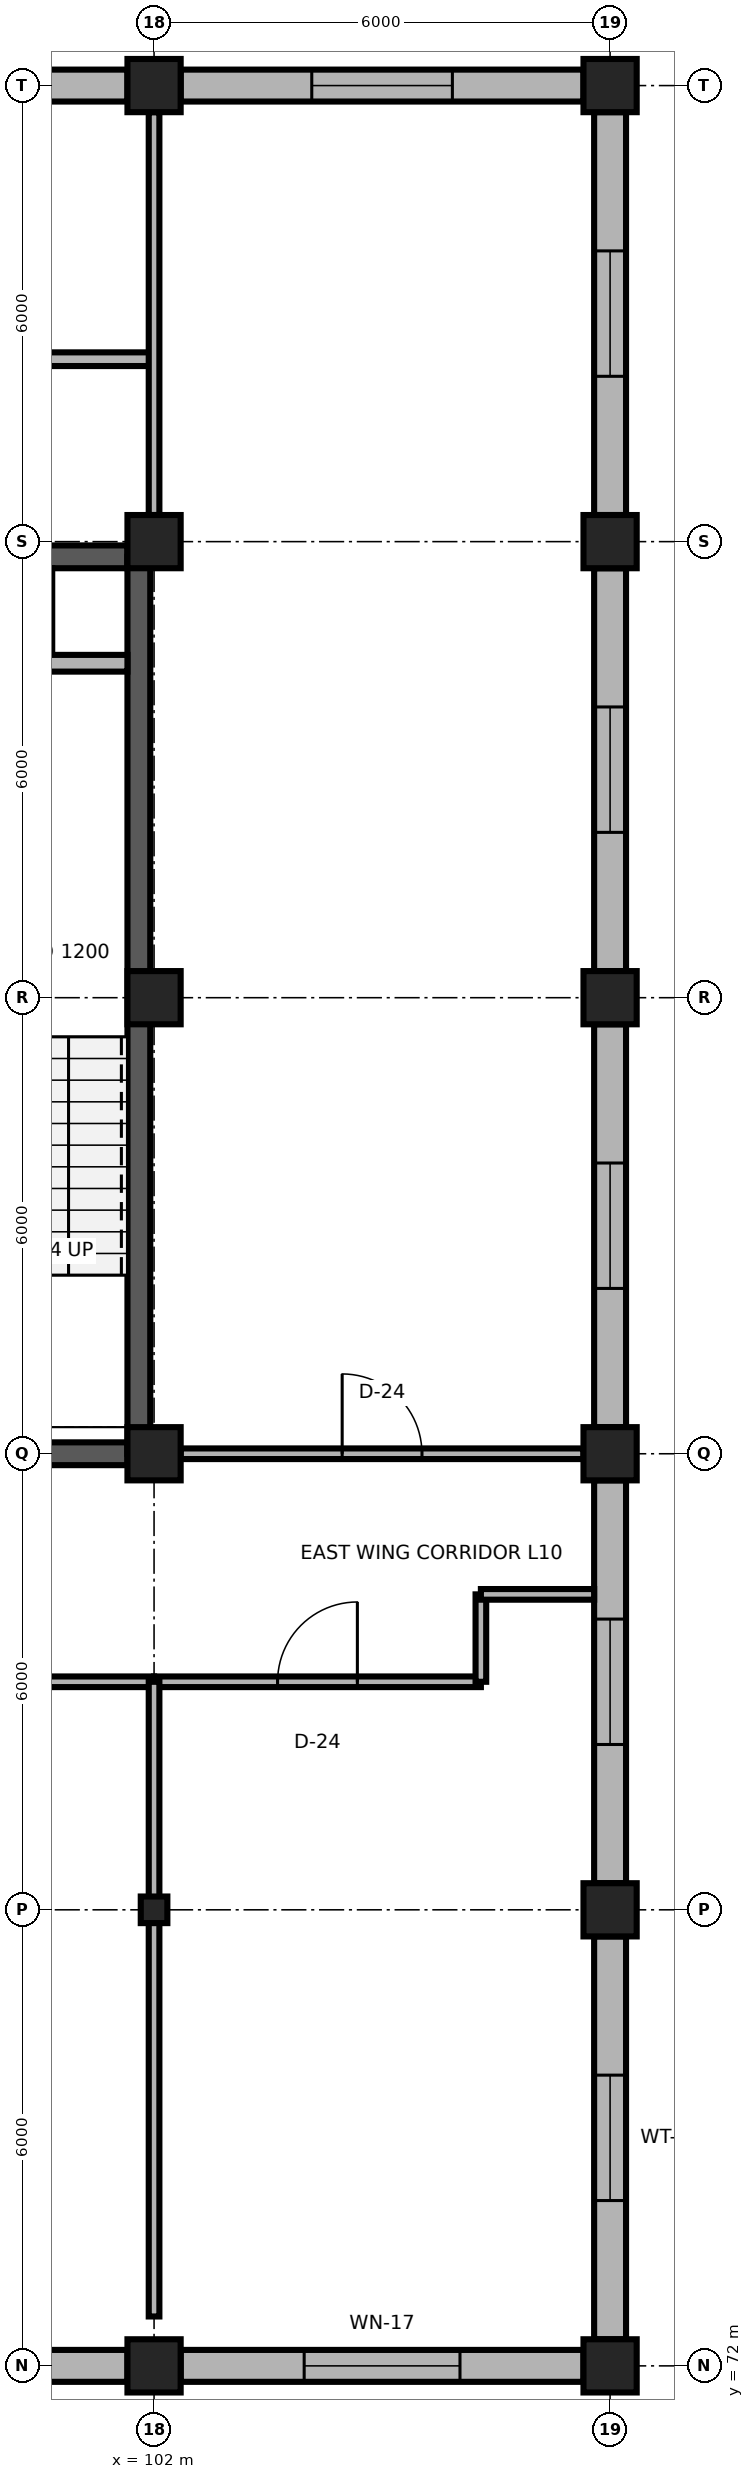
"""IFC4 building model, lengths in metres.
Left out: names, types, materials, properties, quantities, classifications, styles, units other than length and angle.
Written with IfcOpenShell. Run it as: python <this file> out.ifc"""

import sys

from ifc_helpers import new_model, si_unit, direction, frame, frame_2d, origin, origin_2d, place, context, subcontext, project, spatial, rectangle, i_section, extrude, element, fill, save


model = new_model("IFC4")
c1 = context("Model", 3, precision=1e-05, world=origin(), true_north=direction((0.0, 1.0)))
c2 = subcontext(c1, "Body", "Model", "MODEL_VIEW")
j1 = project(units=[si_unit("LENGTHUNIT", "METRE"), si_unit("PLANEANGLEUNIT", "RADIAN")], contexts=[c1])
p1 = place(None, origin())
s1 = spatial("IfcSite", under=j1, at=p1, CompositionType="ELEMENT")
p2 = place(p1, origin())
s2 = spatial("IfcBuilding", under=s1, at=p2, CompositionType="ELEMENT")
p3 = place(p2, frame((0.0, 0.0, 40.5)))
s3 = spatial("IfcBuildingStorey", under=s2, at=p3, CompositionType="ELEMENT", Elevation=40.5)
for number, where, z_axis, x_axis in (
    (1, (102.0, 72.0, 0.0), (0.0, 0.0, 1.0), (1.0, 0.0, 0.0)),
    (2, (108.0, 72.0, 0.0), (0.0, 0.0, 1.0), (1.0, 0.0, 0.0)),
):
    element("IfcColumn", number, at=place(p3, frame(where, z_axis=z_axis, x_axis=x_axis)), inside=s3, PredefinedType="COLUMN", context=c2, shape_type="SweptSolid", body=[
        extrude(rectangle(XDim=0.7, YDim=0.7, at=origin_2d()), origin(), (0.0, 0.0, 1.0), 3.9),
    ])
p4 = place(p3, frame((102.0, 78.0, 0.0), z_axis=(0.0, 0.0, 1.0), x_axis=(1.0, 0.0, 0.0)))
e3 = element("IfcColumn", 3, at=p4, inside=s3, PredefinedType="COLUMN", context=c2, shape_type="SweptSolid", body=[
    extrude(i_section(OverallWidth=0.35, OverallDepth=0.35, WebThickness=0.012, FlangeThickness=0.019, FilletRadius=0.02, at=origin_2d()), origin(), (0.0, 0.0, 1.0), 3.9),
])
for number, where, z_axis, x_axis in (
    (4, (108.0, 78.0, 0.0), (0.0, 0.0, 1.0), (1.0, 0.0, 0.0)),
    (5, (102.0, 84.0, 0.0), (0.0, 0.0, 1.0), (1.0, 0.0, 0.0)),
    (6, (108.0, 84.0, 0.0), (0.0, 0.0, 1.0), (1.0, 0.0, 0.0)),
    (7, (102.0, 90.0, 0.0), (0.0, 0.0, 1.0), (1.0, 0.0, 0.0)),
    (8, (108.0, 90.0, 0.0), (0.0, 0.0, 1.0), (1.0, 0.0, 0.0)),
    (9, (102.0, 96.0, 0.0), (0.0, 0.0, 1.0), (1.0, 0.0, 0.0)),
    (10, (108.0, 96.0, 0.0), (0.0, 0.0, 1.0), (1.0, 0.0, 0.0)),
    (11, (102.0, 102.0, 0.0), (0.0, 0.0, 1.0), (1.0, 0.0, 0.0)),
    (12, (108.0, 102.0, 0.0), (0.0, 0.0, 1.0), (1.0, 0.0, 0.0)),
):
    element("IfcColumn", number, at=place(p3, frame(where, z_axis=z_axis, x_axis=x_axis)), inside=s3, PredefinedType="COLUMN", context=c2, shape_type="SweptSolid", body=[
        extrude(rectangle(XDim=0.7, YDim=0.7, at=origin_2d()), origin(), (0.0, 0.0, 1.0), 3.9),
    ])
p5 = place(p3, frame((96.35, 72.0, 0.0), z_axis=(0.0, 0.0, 1.0), x_axis=(1.0, 0.0, 0.0)))
e13 = element("IfcWall", 13, at=p5, inside=s3, PredefinedType="SOLIDWALL", context=c2, shape_type="SweptSolid", body=[
    extrude(rectangle(XDim=5.3, YDim=0.42, at=frame_2d((2.65, 0.0))), origin(), (0.0, 0.0, 1.0), 3.32),
])
p6 = place(p5, frame((1.625, 0.0, 0.85)))
e14 = element("IfcOpeningElement", 14, at=p6, cuts=e13, PredefinedType="OPENING", context=c2, shape_type="SweptSolid", body=[
    extrude(rectangle(XDim=2.05, YDim=2.0, at=frame_2d((1.025, 1.0))), frame((0.0, 0.225, 0.0), z_axis=(0.0, -1.0, 0.0), x_axis=(1.0, 0.0, 0.0)), (0.0, 0.0, 1.0), 0.45),
])
p7 = place(p3, frame((102.35, 72.0, 0.0), z_axis=(0.0, 0.0, 1.0), x_axis=(1.0, 0.0, 0.0)))
e15 = element("IfcWall", 15, at=p7, inside=s3, PredefinedType="SOLIDWALL", context=c2, shape_type="SweptSolid", body=[
    extrude(rectangle(XDim=5.3, YDim=0.42, at=frame_2d((2.65, 0.0))), origin(), (0.0, 0.0, 1.0), 3.32),
])
p8 = place(p7, frame((1.625, 0.0, 0.85)))
e16 = element("IfcOpeningElement", 16, at=p8, cuts=e15, PredefinedType="OPENING", context=c2, shape_type="SweptSolid", body=[
    extrude(rectangle(XDim=2.05, YDim=2.0, at=frame_2d((1.025, 1.0))), frame((0.0, 0.225, 0.0), z_axis=(0.0, -1.0, 0.0), x_axis=(1.0, 0.0, 0.0)), (0.0, 0.0, 1.0), 0.45),
])
p9 = place(p3, frame((96.35, 102.0, 0.0), z_axis=(0.0, 0.0, 1.0), x_axis=(1.0, 0.0, 0.0)))
e17 = element("IfcWall", 17, at=p9, inside=s3, PredefinedType="SOLIDWALL", context=c2, shape_type="SweptSolid", body=[
    extrude(rectangle(XDim=5.3, YDim=0.42, at=frame_2d((2.65, 0.0))), origin(), (0.0, 0.0, 1.0), 3.32),
])
p10 = place(p9, frame((1.725, 0.0, 0.85)))
e18 = element("IfcOpeningElement", 18, at=p10, cuts=e17, PredefinedType="OPENING", context=c2, shape_type="SweptSolid", body=[
    extrude(rectangle(XDim=1.85, YDim=2.0, at=frame_2d((0.925, 1.0))), frame((0.0, 0.225, 0.0), z_axis=(0.0, -1.0, 0.0), x_axis=(1.0, 0.0, 0.0)), (0.0, 0.0, 1.0), 0.45),
])
p11 = place(p3, frame((102.35, 102.0, 0.0), z_axis=(0.0, 0.0, 1.0), x_axis=(1.0, 0.0, 0.0)))
e19 = element("IfcWall", 19, at=p11, inside=s3, PredefinedType="SOLIDWALL", context=c2, shape_type="SweptSolid", body=[
    extrude(rectangle(XDim=5.3, YDim=0.42, at=frame_2d((2.65, 0.0))), origin(), (0.0, 0.0, 1.0), 3.32),
])
p12 = place(p11, frame((1.725, 0.0, 0.85)))
e20 = element("IfcOpeningElement", 20, at=p12, cuts=e19, PredefinedType="OPENING", context=c2, shape_type="SweptSolid", body=[
    extrude(rectangle(XDim=1.85, YDim=2.0, at=frame_2d((0.925, 1.0))), frame((0.0, 0.225, 0.0), z_axis=(0.0, -1.0, 0.0), x_axis=(1.0, 0.0, 0.0)), (0.0, 0.0, 1.0), 0.45),
])
p13 = place(p3, frame((108.0, 72.35, 0.0), z_axis=(0.0, 0.0, 1.0), x_axis=(0.0, 1.0, 0.0)))
e21 = element("IfcWall", 21, at=p13, inside=s3, PredefinedType="SOLIDWALL", context=c2, shape_type="SweptSolid", body=[
    extrude(rectangle(XDim=5.3, YDim=0.42, at=frame_2d((2.65, 0.0))), origin(), (0.0, 0.0, 1.0), 3.32),
])
p14 = place(p13, frame((1.825, 0.0, 0.85)))
e22 = element("IfcOpeningElement", 22, at=p14, cuts=e21, PredefinedType="OPENING", context=c2, shape_type="SweptSolid", body=[
    extrude(rectangle(XDim=1.65, YDim=1.95, at=frame_2d((0.825, 0.975))), frame((0.0, 0.225, 0.0), z_axis=(0.0, -1.0, 0.0), x_axis=(1.0, 0.0, 0.0)), (0.0, 0.0, 1.0), 0.45),
])
p15 = place(p3, frame((108.0, 78.35, 0.0), z_axis=(0.0, 0.0, 1.0), x_axis=(0.0, 1.0, 0.0)))
e23 = element("IfcWall", 23, at=p15, inside=s3, PredefinedType="SOLIDWALL", context=c2, shape_type="SweptSolid", body=[
    extrude(rectangle(XDim=5.3, YDim=0.42, at=frame_2d((2.65, 0.0))), origin(), (0.0, 0.0, 1.0), 3.32),
])
p16 = place(p15, frame((1.825, 0.0, 0.85)))
e24 = element("IfcOpeningElement", 24, at=p16, cuts=e23, PredefinedType="OPENING", context=c2, shape_type="SweptSolid", body=[
    extrude(rectangle(XDim=1.65, YDim=1.95, at=frame_2d((0.825, 0.975))), frame((0.0, 0.225, 0.0), z_axis=(0.0, -1.0, 0.0), x_axis=(1.0, 0.0, 0.0)), (0.0, 0.0, 1.0), 0.45),
])
p17 = place(p3, frame((108.0, 84.35, 0.0), z_axis=(0.0, 0.0, 1.0), x_axis=(0.0, 1.0, 0.0)))
e25 = element("IfcWall", 25, at=p17, inside=s3, PredefinedType="SOLIDWALL", context=c2, shape_type="SweptSolid", body=[
    extrude(rectangle(XDim=5.3, YDim=0.42, at=frame_2d((2.65, 0.0))), origin(), (0.0, 0.0, 1.0), 3.32),
])
p18 = place(p17, frame((1.825, 0.0, 0.85)))
e26 = element("IfcOpeningElement", 26, at=p18, cuts=e25, PredefinedType="OPENING", context=c2, shape_type="SweptSolid", body=[
    extrude(rectangle(XDim=1.65, YDim=1.95, at=frame_2d((0.825, 0.975))), frame((0.0, 0.225, 0.0), z_axis=(0.0, -1.0, 0.0), x_axis=(1.0, 0.0, 0.0)), (0.0, 0.0, 1.0), 0.45),
])
p19 = place(p3, frame((108.0, 90.35, 0.0), z_axis=(0.0, 0.0, 1.0), x_axis=(0.0, 1.0, 0.0)))
e27 = element("IfcWall", 27, at=p19, inside=s3, PredefinedType="SOLIDWALL", context=c2, shape_type="SweptSolid", body=[
    extrude(rectangle(XDim=5.3, YDim=0.42, at=frame_2d((2.65, 0.0))), origin(), (0.0, 0.0, 1.0), 3.32),
])
p20 = place(p19, frame((1.825, 0.0, 0.85)))
e28 = element("IfcOpeningElement", 28, at=p20, cuts=e27, PredefinedType="OPENING", context=c2, shape_type="SweptSolid", body=[
    extrude(rectangle(XDim=1.65, YDim=1.95, at=frame_2d((0.825, 0.975))), frame((0.0, 0.225, 0.0), z_axis=(0.0, -1.0, 0.0), x_axis=(1.0, 0.0, 0.0)), (0.0, 0.0, 1.0), 0.45),
])
p21 = place(p3, frame((108.0, 96.35, 0.0), z_axis=(0.0, 0.0, 1.0), x_axis=(0.0, 1.0, 0.0)))
e29 = element("IfcWall", 29, at=p21, inside=s3, PredefinedType="SOLIDWALL", context=c2, shape_type="SweptSolid", body=[
    extrude(rectangle(XDim=5.3, YDim=0.42, at=frame_2d((2.65, 0.0))), origin(), (0.0, 0.0, 1.0), 3.32),
])
p22 = place(p21, frame((1.825, 0.0, 0.85)))
e30 = element("IfcOpeningElement", 30, at=p22, cuts=e29, PredefinedType="OPENING", context=c2, shape_type="SweptSolid", body=[
    extrude(rectangle(XDim=1.65, YDim=1.95, at=frame_2d((0.825, 0.975))), frame((0.0, 0.225, 0.0), z_axis=(0.0, -1.0, 0.0), x_axis=(1.0, 0.0, 0.0)), (0.0, 0.0, 1.0), 0.45),
])
p23 = place(p3, frame((96.35, 84.0, 0.0), z_axis=(0.0, 0.0, 1.0), x_axis=(1.0, 0.0, 0.0)))
e31 = element("IfcWall", 31, at=p23, inside=s3, PredefinedType="SHEAR", context=c2, shape_type="SweptSolid", body=[
    extrude(rectangle(XDim=5.3, YDim=0.3, at=frame_2d((2.65, 0.0))), origin(), (0.0, 0.0, 1.0), 3.66),
])
p24 = place(p23, frame((1.975, 0.0, 0.0)))
e32 = element("IfcOpeningElement", 32, at=p24, cuts=e31, PredefinedType="OPENING", context=c2, shape_type="SweptSolid", body=[
    extrude(rectangle(XDim=1.35, YDim=2.2, at=frame_2d((0.675, 1.1))), frame((0.0, 0.165, 0.0), z_axis=(0.0, -1.0, 0.0), x_axis=(1.0, 0.0, 0.0)), (0.0, 0.0, 1.0), 0.33),
])
p25 = place(p3, frame((96.35, 95.8, 0.0), z_axis=(0.0, 0.0, 1.0), x_axis=(1.0, 0.0, 0.0)))
e33 = element("IfcWall", 33, at=p25, inside=s3, PredefinedType="SHEAR", context=c2, shape_type="SweptSolid", body=[
    extrude(rectangle(XDim=5.3, YDim=0.3, at=frame_2d((2.65, 0.0))), origin(), (0.0, 0.0, 1.0), 3.74),
])
p26 = place(p3, frame((101.8, 84.0, 0.0), z_axis=(0.0, 0.0, 1.0), x_axis=(0.0, 1.0, 0.0)))
e34 = element("IfcWall", 34, at=p26, inside=s3, PredefinedType="SHEAR", context=c2, shape_type="SweptSolid", body=[
    extrude(rectangle(XDim=11.8, YDim=0.3, at=frame_2d((5.9, 0.0))), origin(), (0.0, 0.0, 1.0), 3.74),
])
p27 = place(p3, frame((100.55, 94.4, 0.0), z_axis=(0.0, 0.0, 1.0), x_axis=(0.0, 1.0, 0.0)))
e35 = element("IfcWall", 35, at=p27, inside=s3, PredefinedType="PARTITIONING", context=c2, shape_type="SweptSolid", body=[
    extrude(rectangle(XDim=1.25, YDim=0.22, at=frame_2d((0.625, 0.0))), origin(), (0.0, 0.0, 1.0), 3.74),
])
p28 = place(p3, frame((100.55, 94.4, 0.0), z_axis=(0.0, 0.0, 1.0), x_axis=(1.0, 0.0, 0.0)))
e36 = element("IfcWall", 36, at=p28, inside=s3, PredefinedType="PARTITIONING", context=c2, shape_type="SweptSolid", body=[
    extrude(rectangle(XDim=1.1, YDim=0.22, at=frame_2d((0.55, 0.0))), origin(), (0.0, 0.0, 1.0), 3.74),
])
p29 = place(p3, frame((96.0, 81.0, 0.0), z_axis=(0.0, 0.0, 1.0), x_axis=(1.0, 0.0, 0.0)))
e37 = element("IfcWall", 37, at=p29, inside=s3, PredefinedType="PARTITIONING", context=c2, shape_type="SweptSolid", body=[
    extrude(rectangle(XDim=6.0, YDim=0.14, at=frame_2d((3.0, 0.0))), origin(), (0.0, 0.0, 1.0), 3.74),
])
p30 = place(p29, frame((2.475, 0.0, 0.0)))
e38 = element("IfcOpeningElement", 38, at=p30, cuts=e37, PredefinedType="OPENING", context=c2, shape_type="SweptSolid", body=[
    extrude(rectangle(XDim=1.05, YDim=2.25, at=frame_2d((0.525, 1.125))), frame((0.0, 0.085, 0.0), z_axis=(0.0, -1.0, 0.0), x_axis=(1.0, 0.0, 0.0)), (0.0, 0.0, 1.0), 0.17),
])
p31 = place(p3, frame((102.0, 81.0, 0.0), z_axis=(0.0, 0.0, 1.0), x_axis=(1.0, 0.0, 0.0)))
e39 = element("IfcWall", 39, at=p31, inside=s3, PredefinedType="PARTITIONING", context=c2, shape_type="SweptSolid", body=[
    extrude(rectangle(XDim=4.3, YDim=0.14, at=frame_2d((2.15, 0.0))), origin(), (0.0, 0.0, 1.0), 3.74),
])
p32 = place(p31, frame((1.625, 0.0, 0.0)))
e40 = element("IfcOpeningElement", 40, at=p32, cuts=e39, PredefinedType="OPENING", context=c2, shape_type="SweptSolid", body=[
    extrude(rectangle(XDim=1.05, YDim=2.25, at=frame_2d((0.525, 1.125))), frame((0.0, 0.085, 0.0), z_axis=(0.0, -1.0, 0.0), x_axis=(1.0, 0.0, 0.0)), (0.0, 0.0, 1.0), 0.17),
])
p33 = place(p3, frame((102.35, 84.0, 0.0), z_axis=(0.0, 0.0, 1.0), x_axis=(1.0, 0.0, 0.0)))
e41 = element("IfcWall", 41, at=p33, inside=s3, PredefinedType="PARTITIONING", context=c2, shape_type="SweptSolid", body=[
    extrude(rectangle(XDim=5.3, YDim=0.14, at=frame_2d((2.65, 0.0))), origin(), (0.0, 0.0, 1.0), 3.348),
])
p34 = place(p33, frame((2.125, 0.0, 0.0)))
e42 = element("IfcOpeningElement", 42, at=p34, cuts=e41, PredefinedType="OPENING", context=c2, shape_type="SweptSolid", body=[
    extrude(rectangle(XDim=1.05, YDim=2.25, at=frame_2d((0.525, 1.125))), frame((0.0, 0.085, 0.0), z_axis=(0.0, -1.0, 0.0), x_axis=(1.0, 0.0, 0.0)), (0.0, 0.0, 1.0), 0.17),
])
p35 = place(p3, frame((102.0, 72.65, 0.0), z_axis=(0.0, 0.0, 1.0), x_axis=(0.0, 1.0, 0.0)))
e43 = element("IfcWall", 43, at=p35, inside=s3, PredefinedType="PARTITIONING", context=c2, shape_type="SweptSolid", body=[
    extrude(rectangle(XDim=8.35, YDim=0.14, at=frame_2d((4.175, 0.0))), origin(), (0.0, 0.0, 1.0), 3.348),
])
p36 = place(p3, frame((106.3, 81.0, 0.0), z_axis=(0.0, 0.0, 1.0), x_axis=(0.0, 1.0, 0.0)))
e44 = element("IfcWall", 44, at=p36, inside=s3, PredefinedType="PARTITIONING", context=c2, shape_type="SweptSolid", body=[
    extrude(rectangle(XDim=1.15, YDim=0.14, at=frame_2d((0.575, 0.0))), origin(), (0.0, 0.0, 1.0), 3.74),
])
p37 = place(p3, frame((106.3, 82.15, 0.0), z_axis=(0.0, 0.0, 1.0), x_axis=(1.0, 0.0, 0.0)))
e45 = element("IfcWall", 45, at=p37, inside=s3, PredefinedType="PARTITIONING", context=c2, shape_type="SweptSolid", body=[
    extrude(rectangle(XDim=1.49, YDim=0.14, at=frame_2d((0.745, 0.0))), origin(), (0.0, 0.0, 1.0), 3.74),
])
p38 = place(p3, frame((90.0, 98.4, 0.0), z_axis=(0.0, 0.0, 1.0), x_axis=(1.0, 0.0, 0.0)))
e46 = element("IfcWall", 46, at=p38, inside=s3, PredefinedType="PARTITIONING", context=c2, shape_type="SweptSolid", body=[
    extrude(rectangle(XDim=12.0, YDim=0.18, at=frame_2d((6.0, 0.0))), origin(), (0.0, 0.0, 1.0), 3.74),
])
p39 = place(p3, frame((102.0, 96.35, 0.0), z_axis=(0.0, 0.0, 1.0), x_axis=(0.0, 1.0, 0.0)))
e47 = element("IfcWall", 47, at=p39, inside=s3, PredefinedType="PARTITIONING", context=c2, shape_type="SweptSolid", body=[
    extrude(rectangle(XDim=5.3, YDim=0.14, at=frame_2d((2.65, 0.0))), origin(), (0.0, 0.0, 1.0), 3.348),
])
p40 = place(p8, origin())
e48 = element("IfcWindow", 48, at=p40, inside=s3, PartitioningType="SINGLE_PANEL", PredefinedType="WINDOW", context=c2, shape_type="SweptSolid", body=[
    extrude(rectangle(XDim=2.05, YDim=2.0, at=frame_2d((1.025, 1.0))), frame((0.0, 0.03, 0.0), z_axis=(0.0, -1.0, 0.0), x_axis=(1.0, 0.0, 0.0)), (0.0, 0.0, 1.0), 0.06),
])
fill(e16, e48)
p41 = place(p12, origin())
e49 = element("IfcWindow", 49, at=p41, inside=s3, PartitioningType="SINGLE_PANEL", PredefinedType="WINDOW", context=c2, shape_type="SweptSolid", body=[
    extrude(rectangle(XDim=1.85, YDim=2.0, at=frame_2d((0.925, 1.0))), frame((0.0, 0.03, 0.0), z_axis=(0.0, -1.0, 0.0), x_axis=(1.0, 0.0, 0.0)), (0.0, 0.0, 1.0), 0.06),
])
fill(e20, e49)
p42 = place(p14, origin())
e50 = element("IfcWindow", 50, at=p42, inside=s3, PartitioningType="SINGLE_PANEL", PredefinedType="WINDOW", context=c2, shape_type="SweptSolid", body=[
    extrude(rectangle(XDim=1.65, YDim=1.95, at=frame_2d((0.825, 0.975))), frame((0.0, 0.03, 0.0), z_axis=(0.0, -1.0, 0.0), x_axis=(1.0, 0.0, 0.0)), (0.0, 0.0, 1.0), 0.06),
])
fill(e22, e50)
p43 = place(p16, origin())
e51 = element("IfcWindow", 51, at=p43, inside=s3, PartitioningType="SINGLE_PANEL", PredefinedType="WINDOW", context=c2, shape_type="SweptSolid", body=[
    extrude(rectangle(XDim=1.65, YDim=1.95, at=frame_2d((0.825, 0.975))), frame((0.0, 0.03, 0.0), z_axis=(0.0, -1.0, 0.0), x_axis=(1.0, 0.0, 0.0)), (0.0, 0.0, 1.0), 0.06),
])
fill(e24, e51)
p44 = place(p18, origin())
e52 = element("IfcWindow", 52, at=p44, inside=s3, PartitioningType="SINGLE_PANEL", PredefinedType="WINDOW", context=c2, shape_type="SweptSolid", body=[
    extrude(rectangle(XDim=1.65, YDim=1.95, at=frame_2d((0.825, 0.975))), frame((0.0, 0.03, 0.0), z_axis=(0.0, -1.0, 0.0), x_axis=(1.0, 0.0, 0.0)), (0.0, 0.0, 1.0), 0.06),
])
fill(e26, e52)
p45 = place(p20, origin())
e53 = element("IfcWindow", 53, at=p45, inside=s3, PartitioningType="SINGLE_PANEL", PredefinedType="WINDOW", context=c2, shape_type="SweptSolid", body=[
    extrude(rectangle(XDim=1.65, YDim=1.95, at=frame_2d((0.825, 0.975))), frame((0.0, 0.03, 0.0), z_axis=(0.0, -1.0, 0.0), x_axis=(1.0, 0.0, 0.0)), (0.0, 0.0, 1.0), 0.06),
])
fill(e28, e53)
p46 = place(p22, origin())
e54 = element("IfcWindow", 54, at=p46, inside=s3, PartitioningType="SINGLE_PANEL", PredefinedType="WINDOW", context=c2, shape_type="SweptSolid", body=[
    extrude(rectangle(XDim=1.65, YDim=1.95, at=frame_2d((0.825, 0.975))), frame((0.0, 0.03, 0.0), z_axis=(0.0, -1.0, 0.0), x_axis=(1.0, 0.0, 0.0)), (0.0, 0.0, 1.0), 0.06),
])
fill(e30, e54)
p47 = place(p32, origin())
e55 = element("IfcDoor", 55, at=p47, inside=s3, OperationType="SINGLE_SWING_RIGHT", PredefinedType="DOOR", context=c2, shape_type="SweptSolid", body=[
    extrude(rectangle(XDim=1.05, YDim=2.25, at=frame_2d((0.525, 1.125))), frame((0.0, 0.025, 0.0), z_axis=(0.0, -1.0, 0.0), x_axis=(1.0, 0.0, 0.0)), (0.0, 0.0, 1.0), 0.05),
])
fill(e40, e55)
p48 = place(p34, origin())
e56 = element("IfcDoor", 56, at=p48, inside=s3, OperationType="SINGLE_SWING_LEFT", PredefinedType="DOOR", context=c2, shape_type="SweptSolid", body=[
    extrude(rectangle(XDim=1.05, YDim=2.25, at=frame_2d((0.525, 1.125))), frame((0.0, 0.025, 0.0), z_axis=(0.0, -1.0, 0.0), x_axis=(1.0, 0.0, 0.0)), (0.0, 0.0, 1.0), 0.05),
])
fill(e42, e56)
save(model, sys.argv[1])
